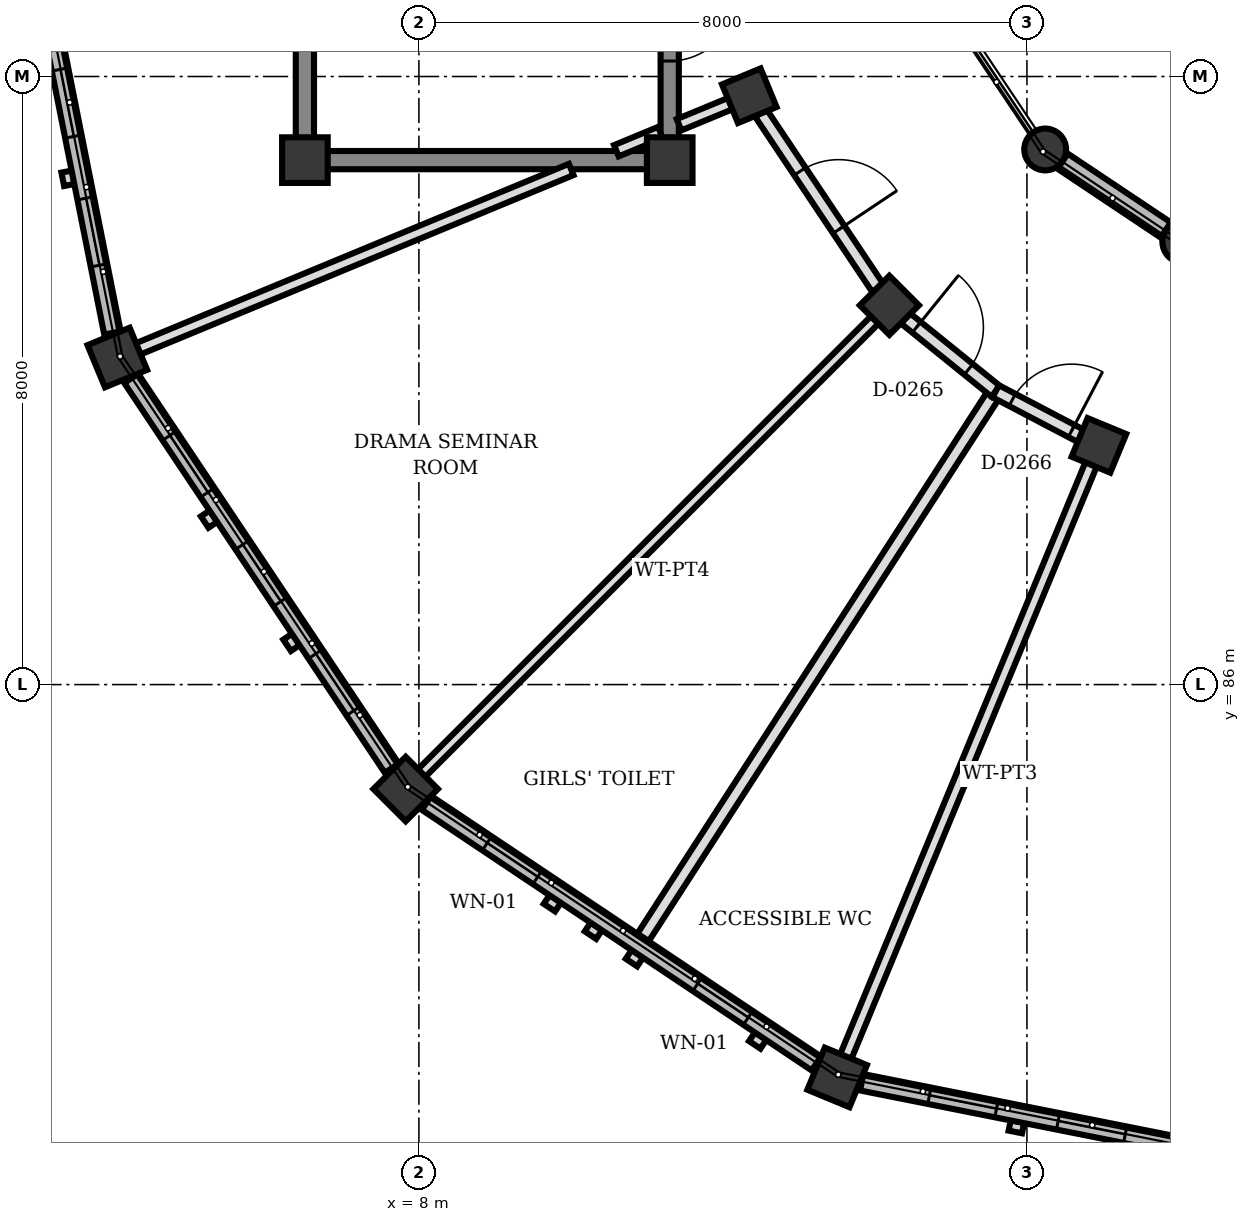
"""IFC4 building model, lengths in metres.
Left out: names, types, materials, properties, quantities, classifications, styles, units other than length and angle.
Written with IfcOpenShell. Run it as: python <this file> out.ifc"""

import sys

from ifc_helpers import new_model, si_unit, direction, frame, frame_2d, origin, origin_2d, place, context, subcontext, project, spatial, rectangle, circle, extrude, element, fill, save


model = new_model("IFC4")
c1 = context("Model", 3, precision=1e-05, world=origin(), true_north=direction((0.0, 1.0)))
c2 = subcontext(c1, "Body", "Model", "MODEL_VIEW")
j1 = project(units=[si_unit("LENGTHUNIT", "METRE"), si_unit("PLANEANGLEUNIT", "RADIAN")], contexts=[c1])
p1 = place(None, origin())
s1 = spatial("IfcSite", under=j1, at=p1, CompositionType="ELEMENT")
p2 = place(p1, origin())
s2 = spatial("IfcBuilding", under=s1, at=p2, CompositionType="ELEMENT")
p3 = place(p2, frame((0.0, 0.0, 8.5)))
s3 = spatial("IfcBuildingStorey", under=s2, at=p3, CompositionType="ELEMENT", Elevation=8.5)
for number, where, z_axis, x_axis in (
    (1, (6.5, 92.9, 0.0), (0.0, 0.0, 1.0), (1.0, 0.0, 0.0)),
    (2, (11.3, 92.9, 0.0), (0.0, 0.0, 1.0), (1.0, 0.0, 0.0)),
):
    element("IfcColumn", number, at=place(p3, frame(where, z_axis=z_axis, x_axis=x_axis)), inside=s3, PredefinedType="COLUMN", context=c2, shape_type="SweptSolid", body=[
        extrude(rectangle(XDim=0.6, YDim=0.6, at=origin_2d()), origin(), (0.0, 0.0, 1.0), 4.0),
    ])
for number, where, z_axis, x_axis in (
    (3, (16.24, 93.04, 0.0), (0.0, 0.0, 1.0), (1.0, 0.0, 0.0)),
    (4, (18.057, 91.826, 0.0), (0.0, 0.0, 1.0), (1.0, 0.0, 0.0)),
):
    element("IfcColumn", number, at=place(p3, frame(where, z_axis=z_axis, x_axis=x_axis)), inside=s3, PredefinedType="COLUMN", context=c2, shape_type="SweptSolid", body=[
        extrude(circle(Radius=0.275, at=origin_2d()), origin(), (0.0, 0.0, 1.0), 4.0),
    ])
for number, where, z_axis, x_axis in (
    (5, (12.347, 93.747, 0.0), (0.0, 0.0, 1.0), (-0.924, -0.383, 0.0)),
    (6, (14.19, 90.99, 0.0), (0.0, 0.0, 1.0), (-0.707, -0.707, 0.0)),
    (7, (16.947, 89.147, 0.0), (0.0, 0.0, 1.0), (-0.383, -0.924, 0.0)),
):
    element("IfcColumn", number, at=place(p3, frame(where, z_axis=z_axis, x_axis=x_axis)), inside=s3, PredefinedType="COLUMN", context=c2, shape_type="SweptSolid", body=[
        extrude(rectangle(XDim=0.55, YDim=0.55, at=origin_2d()), origin(), (0.0, 0.0, 1.0), 4.0),
    ])
for number, where, z_axis, x_axis in (
    (8, (4.032, 90.303, 0.0), (0.0, 0.0, 1.0), (-0.924, -0.383, 0.0)),
    (9, (7.826, 84.626, 0.0), (0.0, 0.0, 1.0), (-0.707, -0.707, 0.0)),
    (10, (13.503, 80.832, 0.0), (0.0, 0.0, 1.0), (-0.383, -0.924, 0.0)),
):
    element("IfcColumn", number, at=place(p3, frame(where, z_axis=z_axis, x_axis=x_axis)), inside=s3, PredefinedType="COLUMN", context=c2, shape_type="SweptSolid", body=[
        extrude(rectangle(XDim=0.6, YDim=0.6, at=origin_2d()), origin(), (0.0, 0.0, 1.0), 4.0),
    ])
p4 = place(p3, frame((3.968, 90.626, 0.0), z_axis=(0.0, 0.0, 1.0), x_axis=(-0.195164813773, 0.980770460131, 0.0)))
e11 = element("IfcWall", 11, at=p4, inside=s3, PredefinedType="SOLIDWALL", context=c2, shape_type="SweptSolid", body=[
    extrude(rectangle(XDim=6.17, YDim=0.22, at=frame_2d((3.085, 0.0))), origin(), (0.0, 0.0, 1.0), 3.172),
])
p5 = place(p4, frame((0.907, 0.0, 0.85)))
e12 = element("IfcOpeningElement", 12, at=p5, cuts=e11, PredefinedType="OPENING", context=c2, shape_type="SweptSolid", body=[
    extrude(rectangle(XDim=0.9, YDim=1.4, at=frame_2d((0.45, 0.7))), frame((0.0, 0.12, 0.0), z_axis=(0.0, -1.0, 0.0), x_axis=(1.0, 0.0, 0.0)), (0.0, 0.0, 1.0), 0.24),
])
p6 = place(p4, frame((2.635, 0.0, 0.85)))
e13 = element("IfcOpeningElement", 13, at=p6, cuts=e11, PredefinedType="OPENING", context=c2, shape_type="SweptSolid", body=[
    extrude(rectangle(XDim=0.9, YDim=1.4, at=frame_2d((0.45, 0.7))), frame((0.0, 0.12, 0.0), z_axis=(0.0, -1.0, 0.0), x_axis=(1.0, 0.0, 0.0)), (0.0, 0.0, 1.0), 0.24),
])
p7 = place(p4, frame((4.362, 0.0, 0.85)))
e14 = element("IfcOpeningElement", 14, at=p7, cuts=e11, PredefinedType="OPENING", context=c2, shape_type="SweptSolid", body=[
    extrude(rectangle(XDim=0.9, YDim=1.4, at=frame_2d((0.45, 0.7))), frame((0.0, 0.12, 0.0), z_axis=(0.0, -1.0, 0.0), x_axis=(1.0, 0.0, 0.0)), (0.0, 0.0, 1.0), 0.24),
])
p8 = place(p3, frame((7.643, 84.9, 0.0), z_axis=(0.0, 0.0, 1.0), x_axis=(-0.555658736667, 0.831410469242, 0.0)))
e15 = element("IfcWall", 15, at=p8, inside=s3, PredefinedType="SOLIDWALL", context=c2, shape_type="SweptSolid", body=[
    extrude(rectangle(XDim=6.169, YDim=0.22, at=frame_2d((3.084, 0.0))), origin(), (0.0, 0.0, 1.0), 3.172),
])
p9 = place(p8, frame((0.907, 0.0, 0.85)))
e16 = element("IfcOpeningElement", 16, at=p9, cuts=e15, PredefinedType="OPENING", context=c2, shape_type="SweptSolid", body=[
    extrude(rectangle(XDim=0.9, YDim=1.4, at=frame_2d((0.45, 0.7))), frame((0.0, 0.12, 0.0), z_axis=(0.0, -1.0, 0.0), x_axis=(1.0, 0.0, 0.0)), (0.0, 0.0, 1.0), 0.24),
])
p10 = place(p8, frame((2.635, 0.0, 0.85)))
e17 = element("IfcOpeningElement", 17, at=p10, cuts=e15, PredefinedType="OPENING", context=c2, shape_type="SweptSolid", body=[
    extrude(rectangle(XDim=0.9, YDim=1.4, at=frame_2d((0.45, 0.7))), frame((0.0, 0.12, 0.0), z_axis=(0.0, -1.0, 0.0), x_axis=(1.0, 0.0, 0.0)), (0.0, 0.0, 1.0), 0.24),
])
p11 = place(p8, frame((4.362, 0.0, 0.85)))
e18 = element("IfcOpeningElement", 18, at=p11, cuts=e15, PredefinedType="OPENING", context=c2, shape_type="SweptSolid", body=[
    extrude(rectangle(XDim=0.9, YDim=1.4, at=frame_2d((0.45, 0.7))), frame((0.0, 0.12, 0.0), z_axis=(0.0, -1.0, 0.0), x_axis=(1.0, 0.0, 0.0)), (0.0, 0.0, 1.0), 0.24),
])
p12 = place(p3, frame((13.229, 81.015, 0.0), z_axis=(0.0, 0.0, 1.0), x_axis=(-0.831379966495, 0.555704374025, 0.0)))
e19 = element("IfcWall", 19, at=p12, inside=s3, PredefinedType="SOLIDWALL", context=c2, shape_type="SweptSolid", body=[
    extrude(rectangle(XDim=6.169, YDim=0.22, at=frame_2d((3.084, 0.0))), origin(), (0.0, 0.0, 1.0), 3.172),
])
p13 = place(p12, frame((1.081, 0.0, 1.15)))
e20 = element("IfcOpeningElement", 20, at=p13, cuts=e19, PredefinedType="OPENING", context=c2, shape_type="SweptSolid", body=[
    extrude(rectangle(XDim=0.8, YDim=1.1, at=frame_2d((0.4, 0.55))), frame((0.0, 0.12, 0.0), z_axis=(0.0, -1.0, 0.0), x_axis=(1.0, 0.0, 0.0)), (0.0, 0.0, 1.0), 0.24),
])
p14 = place(p12, frame((4.412, 0.0, 1.15)))
e21 = element("IfcOpeningElement", 21, at=p14, cuts=e19, PredefinedType="OPENING", context=c2, shape_type="SweptSolid", body=[
    extrude(rectangle(XDim=0.8, YDim=1.1, at=frame_2d((0.4, 0.55))), frame((0.0, 0.12, 0.0), z_axis=(0.0, -1.0, 0.0), x_axis=(1.0, 0.0, 0.0)), (0.0, 0.0, 1.0), 0.24),
])
p15 = place(p3, frame((16.47, 92.886, 0.0), z_axis=(0.0, 0.0, 1.0), x_axis=(0.83165874011, -0.555287078904, 0.0)))
e22 = element("IfcWall", 22, at=p15, inside=s3, PredefinedType="SOLIDWALL", context=c2, shape_type="SweptSolid", body=[
    extrude(rectangle(XDim=1.632, YDim=0.24, at=frame_2d((0.816, 0.0))), origin(), (0.0, 0.0, 1.0), 3.222),
])
p16 = place(p3, frame((19.877, 79.564, 0.0), z_axis=(0.0, 0.0, 1.0), x_axis=(-0.980770460131, 0.195164813773, 0.0)))
e23 = element("IfcWall", 23, at=p16, inside=s3, PredefinedType="SOLIDWALL", context=c2, shape_type="SweptSolid", body=[
    extrude(rectangle(XDim=6.17, YDim=0.22, at=frame_2d((3.085, 0.0))), origin(), (0.0, 0.0, 1.0), 3.172),
])
p17 = place(p16, frame((0.907, 0.0, 0.85)))
e24 = element("IfcOpeningElement", 24, at=p17, cuts=e23, PredefinedType="OPENING", context=c2, shape_type="SweptSolid", body=[
    extrude(rectangle(XDim=0.9, YDim=1.4, at=frame_2d((0.45, 0.7))), frame((0.0, 0.12, 0.0), z_axis=(0.0, -1.0, 0.0), x_axis=(1.0, 0.0, 0.0)), (0.0, 0.0, 1.0), 0.24),
])
p18 = place(p16, frame((2.635, 0.0, 0.85)))
e25 = element("IfcOpeningElement", 25, at=p18, cuts=e23, PredefinedType="OPENING", context=c2, shape_type="SweptSolid", body=[
    extrude(rectangle(XDim=0.9, YDim=1.4, at=frame_2d((0.45, 0.7))), frame((0.0, 0.12, 0.0), z_axis=(0.0, -1.0, 0.0), x_axis=(1.0, 0.0, 0.0)), (0.0, 0.0, 1.0), 0.24),
])
p19 = place(p16, frame((4.362, 0.0, 0.85)))
e26 = element("IfcOpeningElement", 26, at=p19, cuts=e23, PredefinedType="OPENING", context=c2, shape_type="SweptSolid", body=[
    extrude(rectangle(XDim=0.9, YDim=1.4, at=frame_2d((0.45, 0.7))), frame((0.0, 0.12, 0.0), z_axis=(0.0, -1.0, 0.0), x_axis=(1.0, 0.0, 0.0)), (0.0, 0.0, 1.0), 0.24),
])
p20 = place(p3, frame((6.5, 93.192, 0.0), z_axis=(0.0, 0.0, 1.0), x_axis=(0.0, 1.0, 0.0)))
e27 = element("IfcWall", 27, at=p20, inside=s3, PredefinedType="SHEAR", context=c2, shape_type="SweptSolid", body=[
    extrude(rectangle(XDim=8.136, YDim=0.24, at=frame_2d((4.068, 0.0))), origin(), (0.0, 0.0, 1.0), 3.74),
])
p21 = place(p3, frame((11.3, 101.328, 0.0), z_axis=(0.0, 0.0, 1.0), x_axis=(0.0, -1.0, 0.0)))
e28 = element("IfcWall", 28, at=p21, inside=s3, PredefinedType="SHEAR", context=c2, shape_type="SweptSolid", body=[
    extrude(rectangle(XDim=8.136, YDim=0.24, at=frame_2d((4.068, 0.0))), origin(), (0.0, 0.0, 1.0), 3.74),
])
p22 = place(p21, frame((6.244, 0.0, 0.0)))
e29 = element("IfcOpeningElement", 29, at=p22, cuts=e28, PredefinedType="OPENING", context=c2, shape_type="SweptSolid", body=[
    extrude(rectangle(XDim=0.88, YDim=2.1, at=frame_2d((0.44, 1.05))), frame((0.0, 0.13, 0.0), z_axis=(0.0, -1.0, 0.0), x_axis=(1.0, 0.0, 0.0)), (0.0, 0.0, 1.0), 0.26),
])
p23 = place(p3, frame((11.008, 92.9, 0.0), z_axis=(0.0, 0.0, 1.0), x_axis=(-1.0, 0.0, 0.0)))
e30 = element("IfcWall", 30, at=p23, inside=s3, PredefinedType="SHEAR", context=c2, shape_type="SweptSolid", body=[
    extrude(rectangle(XDim=4.216, YDim=0.24, at=frame_2d((2.108, 0.0))), origin(), (0.0, 0.0, 1.0), 3.74),
])
p24 = place(p3, frame((12.1, 93.645, 0.0), z_axis=(0.0, 0.0, 1.0), x_axis=(-0.924069600435, -0.382224245113, 0.0)))
e31 = element("IfcWall", 31, at=p24, inside=s3, PredefinedType="PARTITIONING", context=c2, shape_type="SweptSolid", body=[
    extrude(rectangle(XDim=0.733, YDim=0.16, at=frame_2d((0.366, 0.0))), origin(), (0.0, 0.0, 1.0), 3.072),
])
p25 = place(p3, frame((11.177, 93.263, 0.0), z_axis=(0.0, 0.0, 1.0), x_axis=(-0.923812676193, -0.382844797933, 0.0)))
e32 = element("IfcWall", 32, at=p25, inside=s3, PredefinedType="PARTITIONING", context=c2, shape_type="SweptSolid", body=[
    extrude(rectangle(XDim=0.627, YDim=0.16, at=frame_2d((0.313, 0.0))), origin(), (0.0, 0.0, 1.0), 3.072),
])
p26 = place(p3, frame((10.004, 92.777, 0.0), z_axis=(0.0, 0.0, 1.0), x_axis=(-0.923864955254, -0.382718623082, 0.0)))
e33 = element("IfcWall", 33, at=p26, inside=s3, PredefinedType="PARTITIONING", context=c2, shape_type="SweptSolid", body=[
    extrude(rectangle(XDim=6.172, YDim=0.16, at=frame_2d((3.086, 0.0))), origin(), (0.0, 0.0, 1.0), 3.072),
])
p27 = place(p3, frame((14.001, 90.801, 0.0), z_axis=(0.0, 0.0, 1.0), x_axis=(-0.707106781187, -0.707106781187, 0.0)))
e34 = element("IfcWall", 34, at=p27, inside=s3, PredefinedType="PARTITIONING", context=c2, shape_type="SweptSolid", body=[
    extrude(rectangle(XDim=8.441, YDim=0.14, at=frame_2d((4.221, 0.0))), origin(), (0.0, 0.0, 1.0), 3.072),
])
p28 = place(p3, frame((16.845, 88.9, 0.0), z_axis=(0.0, 0.0, 1.0), x_axis=(-0.382683896966, -0.923879340067, 0.0)))
e35 = element("IfcWall", 35, at=p28, inside=s3, PredefinedType="PARTITIONING", context=c2, shape_type="SweptSolid", body=[
    extrude(rectangle(XDim=8.44, YDim=0.16, at=frame_2d((4.22, 0.0))), origin(), (0.0, 0.0, 1.0), 3.072),
])
p29 = place(p3, frame((15.589, 89.859, 0.0), z_axis=(0.0, 0.0, 1.0), x_axis=(-0.542440235144, -0.840094394278, 0.0)))
e36 = element("IfcWall", 36, at=p29, inside=s3, PredefinedType="PARTITIONING", context=c2, shape_type="SweptSolid", body=[
    extrude(rectangle(XDim=8.552, YDim=0.18, at=frame_2d((4.276, 0.0))), origin(), (0.0, 0.0, 1.0), 3.072),
])
p30 = place(p3, frame((12.498, 93.521, 0.0), z_axis=(0.0, 0.0, 1.0), x_axis=(0.555797002478, -0.831318045056, 0.0)))
e37 = element("IfcWall", 37, at=p30, inside=s3, PredefinedType="PARTITIONING", context=c2, shape_type="SweptSolid", body=[
    extrude(rectangle(XDim=2.773, YDim=0.18, at=frame_2d((1.386, 0.0))), origin(), (0.0, 0.0, 1.0), 3.072),
])
p31 = place(p30, frame((0.926, 0.0, 0.0)))
e38 = element("IfcOpeningElement", 38, at=p31, cuts=e37, PredefinedType="OPENING", context=c2, shape_type="SweptSolid", body=[
    extrude(rectangle(XDim=0.92, YDim=2.1, at=frame_2d((0.46, 1.05))), frame((0.0, 0.1, 0.0), z_axis=(0.0, -1.0, 0.0), x_axis=(1.0, 0.0, 0.0)), (0.0, 0.0, 1.0), 0.2),
])
p32 = place(p3, frame((14.399, 90.821, 0.0), z_axis=(0.0, 0.0, 1.0), x_axis=(0.777668191933, -0.628674942443, 0.0)))
e39 = element("IfcWall", 39, at=p32, inside=s3, PredefinedType="PARTITIONING", context=c2, shape_type="SweptSolid", body=[
    extrude(rectangle(XDim=1.531, YDim=0.18, at=frame_2d((0.765, 0.0))), origin(), (0.0, 0.0, 1.0), 3.072),
])
p33 = place(p32, frame((0.191, 0.0, 0.0)))
e40 = element("IfcOpeningElement", 40, at=p33, cuts=e39, PredefinedType="OPENING", context=c2, shape_type="SweptSolid", body=[
    extrude(rectangle(XDim=0.88, YDim=2.1, at=frame_2d((0.44, 1.05))), frame((0.0, 0.1, 0.0), z_axis=(0.0, -1.0, 0.0), x_axis=(1.0, 0.0, 0.0)), (0.0, 0.0, 1.0), 0.2),
])
p34 = place(p3, frame((15.589, 89.859, 0.0), z_axis=(0.0, 0.0, 1.0), x_axis=(0.88557844419, -0.464489848314, 0.0)))
e41 = element("IfcWall", 41, at=p34, inside=s3, PredefinedType="PARTITIONING", context=c2, shape_type="SweptSolid", body=[
    extrude(rectangle(XDim=1.266, YDim=0.18, at=frame_2d((0.633, 0.0))), origin(), (0.0, 0.0, 1.0), 3.072),
])
p35 = place(p34, frame((0.246, 0.0, 0.0)))
e42 = element("IfcOpeningElement", 42, at=p35, cuts=e41, PredefinedType="OPENING", context=c2, shape_type="SweptSolid", body=[
    extrude(rectangle(XDim=0.88, YDim=2.1, at=frame_2d((0.44, 1.05))), frame((0.0, 0.1, 0.0), z_axis=(0.0, -1.0, 0.0), x_axis=(1.0, 0.0, 0.0)), (0.0, 0.0, 1.0), 0.2),
])
p36 = place(p5, origin())
e43 = element("IfcWindow", 43, at=p36, inside=s3, PartitioningType="SINGLE_PANEL", PredefinedType="WINDOW", context=c2, shape_type="SweptSolid", body=[
    extrude(rectangle(XDim=0.9, YDim=1.4, at=frame_2d((0.45, 0.7))), frame((0.0, 0.03, 0.0), z_axis=(0.0, -1.0, 0.0), x_axis=(1.0, 0.0, 0.0)), (0.0, 0.0, 1.0), 0.06),
])
fill(e12, e43)
p37 = place(p6, origin())
e44 = element("IfcWindow", 44, at=p37, inside=s3, PartitioningType="SINGLE_PANEL", PredefinedType="WINDOW", context=c2, shape_type="SweptSolid", body=[
    extrude(rectangle(XDim=0.9, YDim=1.4, at=frame_2d((0.45, 0.7))), frame((0.0, 0.03, 0.0), z_axis=(0.0, -1.0, 0.0), x_axis=(1.0, 0.0, 0.0)), (0.0, 0.0, 1.0), 0.06),
])
fill(e13, e44)
p38 = place(p9, origin())
e45 = element("IfcWindow", 45, at=p38, inside=s3, PartitioningType="SINGLE_PANEL", PredefinedType="WINDOW", context=c2, shape_type="SweptSolid", body=[
    extrude(rectangle(XDim=0.9, YDim=1.4, at=frame_2d((0.45, 0.7))), frame((0.0, 0.03, 0.0), z_axis=(0.0, -1.0, 0.0), x_axis=(1.0, 0.0, 0.0)), (0.0, 0.0, 1.0), 0.06),
])
fill(e16, e45)
p39 = place(p10, origin())
e46 = element("IfcWindow", 46, at=p39, inside=s3, PartitioningType="SINGLE_PANEL", PredefinedType="WINDOW", context=c2, shape_type="SweptSolid", body=[
    extrude(rectangle(XDim=0.9, YDim=1.4, at=frame_2d((0.45, 0.7))), frame((0.0, 0.03, 0.0), z_axis=(0.0, -1.0, 0.0), x_axis=(1.0, 0.0, 0.0)), (0.0, 0.0, 1.0), 0.06),
])
fill(e17, e46)
p40 = place(p11, origin())
e47 = element("IfcWindow", 47, at=p40, inside=s3, PartitioningType="SINGLE_PANEL", PredefinedType="WINDOW", context=c2, shape_type="SweptSolid", body=[
    extrude(rectangle(XDim=0.9, YDim=1.4, at=frame_2d((0.45, 0.7))), frame((0.0, 0.03, 0.0), z_axis=(0.0, -1.0, 0.0), x_axis=(1.0, 0.0, 0.0)), (0.0, 0.0, 1.0), 0.06),
])
fill(e18, e47)
p41 = place(p13, origin())
e48 = element("IfcWindow", 48, at=p41, inside=s3, PartitioningType="SINGLE_PANEL", PredefinedType="WINDOW", context=c2, shape_type="SweptSolid", body=[
    extrude(rectangle(XDim=0.8, YDim=1.1, at=frame_2d((0.4, 0.55))), frame((0.0, 0.03, 0.0), z_axis=(0.0, -1.0, 0.0), x_axis=(1.0, 0.0, 0.0)), (0.0, 0.0, 1.0), 0.06),
])
fill(e20, e48)
p42 = place(p14, origin())
e49 = element("IfcWindow", 49, at=p42, inside=s3, PartitioningType="SINGLE_PANEL", PredefinedType="WINDOW", context=c2, shape_type="SweptSolid", body=[
    extrude(rectangle(XDim=0.8, YDim=1.1, at=frame_2d((0.4, 0.55))), frame((0.0, 0.03, 0.0), z_axis=(0.0, -1.0, 0.0), x_axis=(1.0, 0.0, 0.0)), (0.0, 0.0, 1.0), 0.06),
])
fill(e21, e49)
p43 = place(p18, origin())
e50 = element("IfcWindow", 50, at=p43, inside=s3, PartitioningType="SINGLE_PANEL", PredefinedType="WINDOW", context=c2, shape_type="SweptSolid", body=[
    extrude(rectangle(XDim=0.9, YDim=1.4, at=frame_2d((0.45, 0.7))), frame((0.0, 0.03, 0.0), z_axis=(0.0, -1.0, 0.0), x_axis=(1.0, 0.0, 0.0)), (0.0, 0.0, 1.0), 0.06),
])
fill(e25, e50)
p44 = place(p19, origin())
e51 = element("IfcWindow", 51, at=p44, inside=s3, PartitioningType="SINGLE_PANEL", PredefinedType="WINDOW", context=c2, shape_type="SweptSolid", body=[
    extrude(rectangle(XDim=0.9, YDim=1.4, at=frame_2d((0.45, 0.7))), frame((0.0, 0.03, 0.0), z_axis=(0.0, -1.0, 0.0), x_axis=(1.0, 0.0, 0.0)), (0.0, 0.0, 1.0), 0.06),
])
fill(e26, e51)
p45 = place(p22, origin())
e52 = element("IfcDoor", 52, at=p45, inside=s3, OperationType="SINGLE_SWING_LEFT", PredefinedType="DOOR", context=c2, shape_type="SweptSolid", body=[
    extrude(rectangle(XDim=0.88, YDim=2.1, at=frame_2d((0.44, 1.05))), frame((0.0, 0.025, 0.0), z_axis=(0.0, -1.0, 0.0), x_axis=(1.0, 0.0, 0.0)), (0.0, 0.0, 1.0), 0.05),
])
fill(e29, e52)
p46 = place(p31, origin())
e53 = element("IfcDoor", 53, at=p46, inside=s3, OperationType="SINGLE_SWING_RIGHT", PredefinedType="DOOR", context=c2, shape_type="SweptSolid", body=[
    extrude(rectangle(XDim=0.92, YDim=2.1, at=frame_2d((0.46, 1.05))), frame((0.0, 0.025, 0.0), z_axis=(0.0, -1.0, 0.0), x_axis=(1.0, 0.0, 0.0)), (0.0, 0.0, 1.0), 0.05),
])
fill(e38, e53)
p47 = place(p33, origin())
e54 = element("IfcDoor", 54, at=p47, inside=s3, OperationType="SINGLE_SWING_LEFT", PredefinedType="DOOR", context=c2, shape_type="SweptSolid", body=[
    extrude(rectangle(XDim=0.88, YDim=2.1, at=frame_2d((0.44, 1.05))), frame((0.0, 0.025, 0.0), z_axis=(0.0, -1.0, 0.0), x_axis=(1.0, 0.0, 0.0)), (0.0, 0.0, 1.0), 0.05),
])
fill(e40, e54)
p48 = place(p35, origin())
e55 = element("IfcDoor", 55, at=p48, inside=s3, OperationType="SINGLE_SWING_RIGHT", PredefinedType="DOOR", context=c2, shape_type="SweptSolid", body=[
    extrude(rectangle(XDim=0.88, YDim=2.1, at=frame_2d((0.44, 1.05))), frame((0.0, 0.025, 0.0), z_axis=(0.0, -1.0, 0.0), x_axis=(1.0, 0.0, 0.0)), (0.0, 0.0, 1.0), 0.05),
])
fill(e42, e55)
save(model, sys.argv[1])
